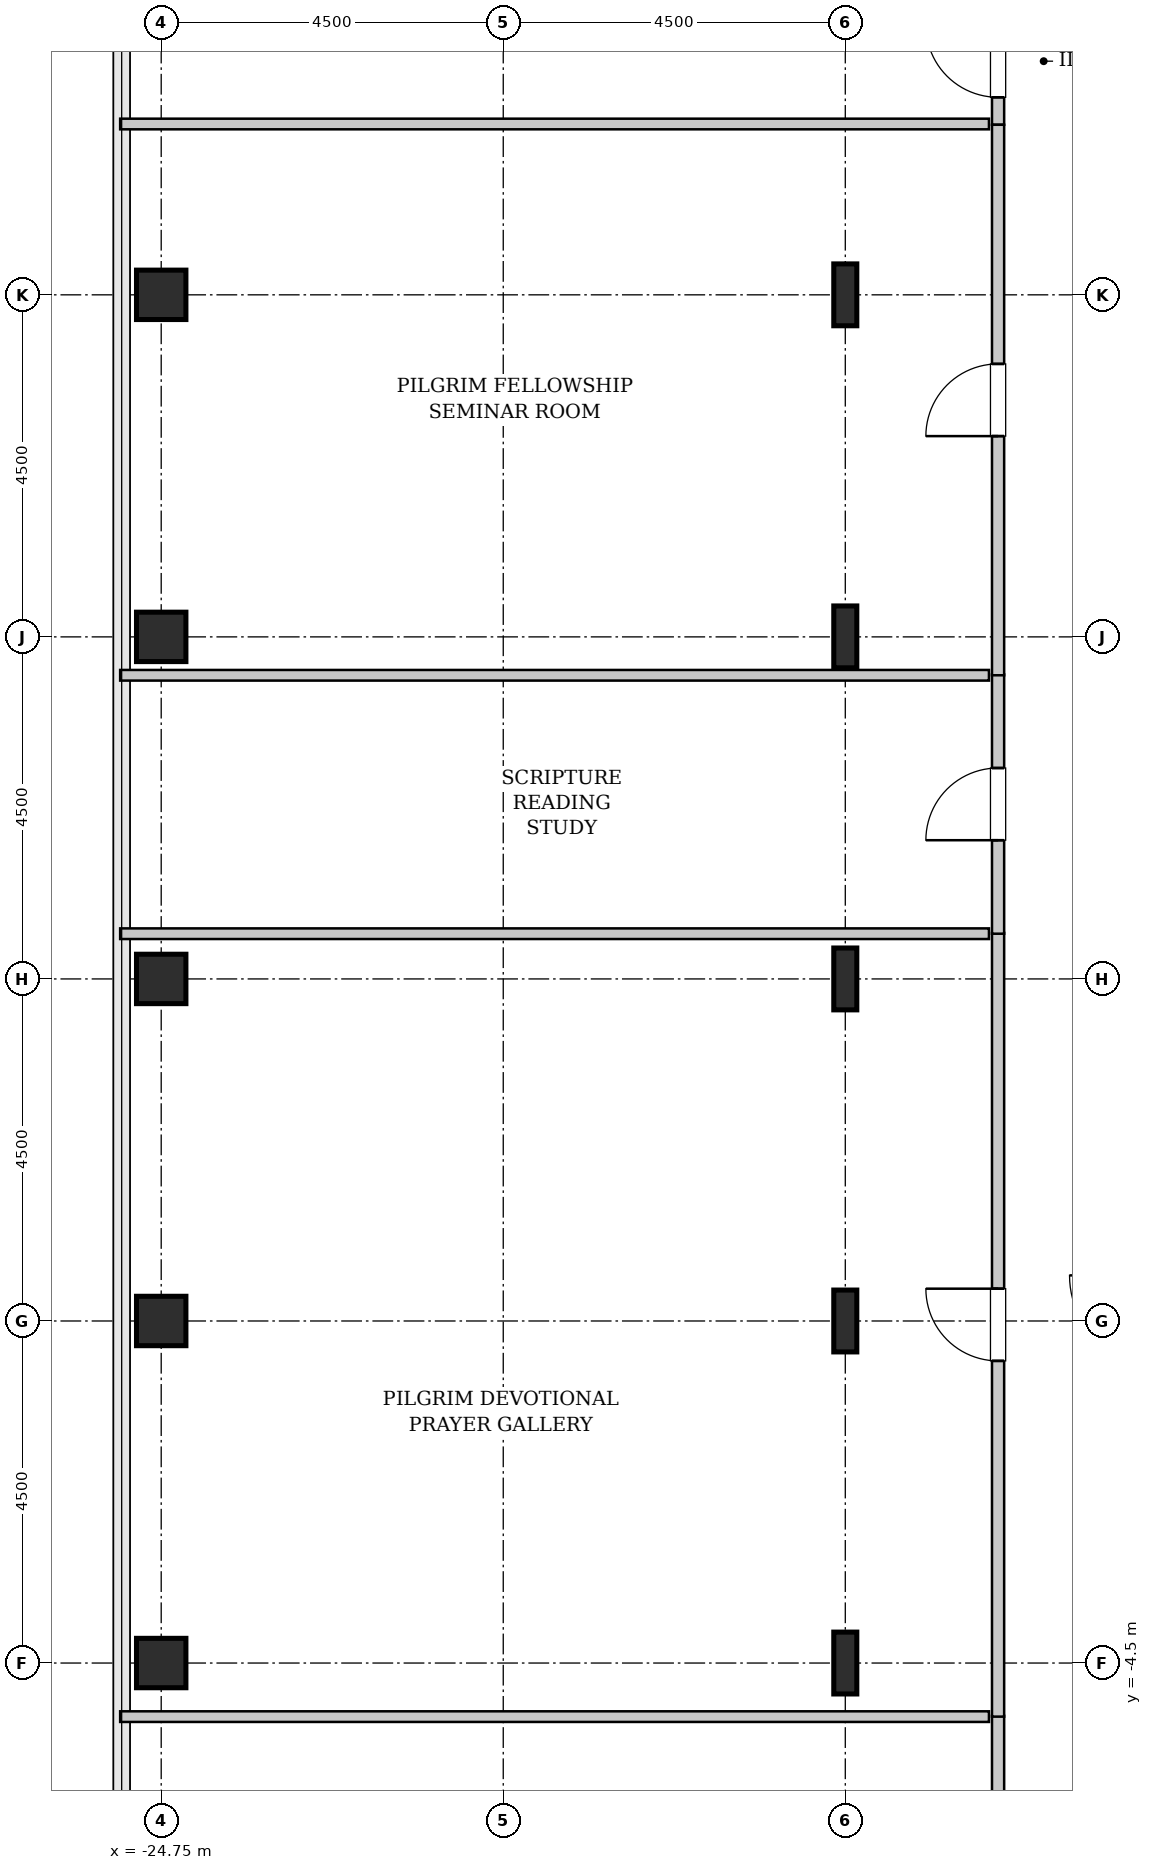
"""IFC4 building model, lengths in metres.
Left out: names, types, materials, properties, quantities, classifications, styles, units other than length and angle.
Written with IfcOpenShell. Run it as: python <this file> out.ifc"""

import sys

from ifc_helpers import new_model, si_unit, direction, frame, frame_2d, origin, origin_2d, place, context, subcontext, project, spatial, rectangle, hollow_rectangle, i_section, extrude, source, transform, mapped, element, fill, save


model = new_model("IFC4")
c1 = context("Model", 3, precision=1e-05, world=origin(), true_north=direction((0.0, 1.0)))
c2 = subcontext(c1, "Body", "Model", "MODEL_VIEW")
j1 = project(units=[si_unit("LENGTHUNIT", "METRE"), si_unit("PLANEANGLEUNIT", "RADIAN")], contexts=[c1])
p1 = place(None, origin())
s1 = spatial("IfcSite", under=j1, at=p1, CompositionType="ELEMENT")
p2 = place(p1, origin())
s2 = spatial("IfcBuilding", under=s1, at=p2, CompositionType="ELEMENT")
p3 = place(p2, frame((0.0, 0.0, 237.0)))
s3 = spatial("IfcBuildingStorey", under=s2, at=p3, CompositionType="ELEMENT", Elevation=237.0)
m1 = source(origin(), c2, "Body", "SweptSolid", [
    extrude(hollow_rectangle(XDim=0.65, YDim=0.65, WallThickness=0.032, InnerFilletRadius=0.032, OuterFilletRadius=0.064, at=origin_2d()), origin(), (0.0, 0.0, 1.0), 3.8),
])
for number, where, z_axis, x_axis in (
    (1, (-24.75, -4.5, 0.0), (0.0, 0.0, 1.0), (1.0, 0.0, 0.0)),
    (2, (-24.75, 0.0, 0.0), (0.0, 0.0, 1.0), (1.0, 0.0, 0.0)),
    (3, (-24.75, 4.5, 0.0), (0.0, 0.0, 1.0), (1.0, 0.0, 0.0)),
    (4, (-24.75, 9.0, 0.0), (0.0, 0.0, 1.0), (1.0, 0.0, 0.0)),
    (5, (-24.75, 13.5, 0.0), (0.0, 0.0, 1.0), (1.0, 0.0, 0.0)),
):
    element("IfcColumn", number, at=place(p3, frame(where, z_axis=z_axis, x_axis=x_axis)), inside=s3, PredefinedType="COLUMN", context=c2, shape_type="MappedRepresentation", body=[
        mapped(m1, transform((0.0, 0.0, 0.0), x_axis=(1.0, 0.0, 0.0), y_axis=(0.0, 1.0, 0.0), z_axis=(0.0, 0.0, 1.0), scale=1.0)),
    ])
m2 = source(origin(), c2, "Body", "SweptSolid", [
    extrude(i_section(OverallWidth=0.303, OverallDepth=0.814, WebThickness=0.021, FlangeThickness=0.04, FilletRadius=0.03, at=origin_2d()), origin(), (0.0, 0.0, 1.0), 3.8),
])
for number, where, z_axis, x_axis in (
    (6, (-15.75, -4.5, 0.0), (0.0, 0.0, 1.0), (1.0, 0.0, 0.0)),
    (7, (-15.75, 0.0, 0.0), (0.0, 0.0, 1.0), (1.0, 0.0, 0.0)),
    (8, (-15.75, 4.5, 0.0), (0.0, 0.0, 1.0), (1.0, 0.0, 0.0)),
    (9, (-15.75, 9.0, 0.0), (0.0, 0.0, 1.0), (1.0, 0.0, 0.0)),
    (10, (-15.75, 13.5, 0.0), (0.0, 0.0, 1.0), (1.0, 0.0, 0.0)),
):
    element("IfcColumn", number, at=place(p3, frame(where, z_axis=z_axis, x_axis=x_axis)), inside=s3, PredefinedType="COLUMN", context=c2, shape_type="MappedRepresentation", body=[
        mapped(m2, transform((0.0, 0.0, 0.0), x_axis=(1.0, 0.0, 0.0), y_axis=(0.0, 1.0, 0.0), z_axis=(0.0, 0.0, 1.0), scale=1.0)),
    ])
m3 = source(origin(), c2, "Body", "SweptSolid", [
    extrude(rectangle(XDim=3.31, YDim=0.16, at=frame_2d((1.655, 0.0))), origin(), (0.0, 0.0, 1.0), 3.535),
])
p4 = place(p3, frame((-13.74, -8.505, 0.0), z_axis=(0.0, 0.0, 1.0), x_axis=(0.0, 1.0, 0.0)))
e11 = element("IfcWall", 11, at=p4, inside=s3, PredefinedType="PARTITIONING", context=c2, shape_type="MappedRepresentation", body=[
    mapped(m3, transform((0.0, 0.0, 0.0), x_axis=(1.0, 0.0, 0.0), y_axis=(0.0, 1.0, 0.0), z_axis=(0.0, 0.0, 1.0), scale=1.0)),
])
p5 = place(p4, frame((1.18, 0.0, 0.0)))
e12 = element("IfcOpeningElement", 12, at=p5, cuts=e11, PredefinedType="OPENING", context=c2, shape_type="SweptSolid", body=[
    extrude(rectangle(XDim=0.95, YDim=2.1, at=frame_2d((0.475, 1.05))), frame((0.0, 0.09, 0.0), z_axis=(0.0, -1.0, 0.0), x_axis=(1.0, 0.0, 0.0)), (0.0, 0.0, 1.0), 0.18),
])
m4 = source(origin(), c2, "Body", "SweptSolid", [
    extrude(rectangle(XDim=11.43, YDim=0.14, at=frame_2d((5.715, 0.0))), origin(), (0.0, 0.0, 1.0), 3.535),
])
p6 = place(p3, frame((-25.29, -5.205, 0.0), z_axis=(0.0, 0.0, 1.0), x_axis=(1.0, 0.0, 0.0)))
e13 = element("IfcWall", 13, at=p6, inside=s3, PredefinedType="PARTITIONING", context=c2, shape_type="MappedRepresentation", body=[
    mapped(m4, transform((0.0, 0.0, 0.0), x_axis=(1.0, 0.0, 0.0), y_axis=(0.0, 1.0, 0.0), z_axis=(0.0, 0.0, 1.0), scale=1.0)),
])
m5 = source(origin(), c2, "Body", "SweptSolid", [
    extrude(rectangle(XDim=10.31, YDim=0.16, at=frame_2d((5.155, 0.0))), origin(), (0.0, 0.0, 1.0), 3.535),
])
p7 = place(p3, frame((-13.74, -5.205, 0.0), z_axis=(0.0, 0.0, 1.0), x_axis=(0.0, 1.0, 0.0)))
e14 = element("IfcWall", 14, at=p7, inside=s3, PredefinedType="PARTITIONING", context=c2, shape_type="MappedRepresentation", body=[
    mapped(m5, transform((0.0, 0.0, 0.0), x_axis=(1.0, 0.0, 0.0), y_axis=(0.0, 1.0, 0.0), z_axis=(0.0, 0.0, 1.0), scale=1.0)),
])
p8 = place(p7, frame((4.68, 0.0, 0.0)))
e15 = element("IfcOpeningElement", 15, at=p8, cuts=e14, PredefinedType="OPENING", context=c2, shape_type="SweptSolid", body=[
    extrude(rectangle(XDim=0.95, YDim=2.1, at=frame_2d((0.475, 1.05))), frame((0.0, 0.09, 0.0), z_axis=(0.0, -1.0, 0.0), x_axis=(1.0, 0.0, 0.0)), (0.0, 0.0, 1.0), 0.18),
])
p9 = place(p3, frame((-25.29, 5.095, 0.0), z_axis=(0.0, 0.0, 1.0), x_axis=(1.0, 0.0, 0.0)))
e16 = element("IfcWall", 16, at=p9, inside=s3, PredefinedType="PARTITIONING", context=c2, shape_type="MappedRepresentation", body=[
    mapped(m4, transform((0.0, 0.0, 0.0), x_axis=(1.0, 0.0, 0.0), y_axis=(0.0, 1.0, 0.0), z_axis=(0.0, 0.0, 1.0), scale=1.0)),
])
m6 = source(origin(), c2, "Body", "SweptSolid", [
    extrude(rectangle(XDim=3.41, YDim=0.16, at=frame_2d((1.705, 0.0))), origin(), (0.0, 0.0, 1.0), 3.535),
])
p10 = place(p3, frame((-13.74, 5.095, 0.0), z_axis=(0.0, 0.0, 1.0), x_axis=(0.0, 1.0, 0.0)))
e17 = element("IfcWall", 17, at=p10, inside=s3, PredefinedType="PARTITIONING", context=c2, shape_type="MappedRepresentation", body=[
    mapped(m6, transform((0.0, 0.0, 0.0), x_axis=(1.0, 0.0, 0.0), y_axis=(0.0, 1.0, 0.0), z_axis=(0.0, 0.0, 1.0), scale=1.0)),
])
p11 = place(p10, frame((1.23, 0.0, 0.0)))
e18 = element("IfcOpeningElement", 18, at=p11, cuts=e17, PredefinedType="OPENING", context=c2, shape_type="SweptSolid", body=[
    extrude(rectangle(XDim=0.95, YDim=2.1, at=frame_2d((0.475, 1.05))), frame((0.0, 0.09, 0.0), z_axis=(0.0, -1.0, 0.0), x_axis=(1.0, 0.0, 0.0)), (0.0, 0.0, 1.0), 0.18),
])
m7 = source(origin(), c2, "Body", "SweptSolid", [
    extrude(rectangle(XDim=11.43, YDim=0.14, at=frame_2d((5.715, 0.0))), origin(), (0.0, 0.0, 1.0), 2.925),
])
p12 = place(p3, frame((-25.29, 8.495, 0.0), z_axis=(0.0, 0.0, 1.0), x_axis=(1.0, 0.0, 0.0)))
e19 = element("IfcWall", 19, at=p12, inside=s3, PredefinedType="PARTITIONING", context=c2, shape_type="MappedRepresentation", body=[
    mapped(m7, transform((0.0, 0.0, 0.0), x_axis=(1.0, 0.0, 0.0), y_axis=(0.0, 1.0, 0.0), z_axis=(0.0, 0.0, 1.0), scale=1.0)),
])
m8 = source(origin(), c2, "Body", "SweptSolid", [
    extrude(rectangle(XDim=5.502, YDim=0.16, at=frame_2d((2.751, 0.0))), origin(), (0.0, 0.0, 1.0), 3.535),
])
p13 = place(p3, frame((-13.74, 15.738, 0.0), z_axis=(0.0, 0.0, 1.0), x_axis=(0.0, 1.0, 0.0)))
e20 = element("IfcWall", 20, at=p13, inside=s3, PredefinedType="PARTITIONING", context=c2, shape_type="MappedRepresentation", body=[
    mapped(m8, transform((0.0, 0.0, 0.0), x_axis=(1.0, 0.0, 0.0), y_axis=(0.0, 1.0, 0.0), z_axis=(0.0, 0.0, 1.0), scale=1.0)),
])
p14 = place(p13, frame((0.361, 0.0, 0.0)))
e21 = element("IfcOpeningElement", 21, at=p14, cuts=e20, PredefinedType="OPENING", context=c2, shape_type="SweptSolid", body=[
    extrude(rectangle(XDim=0.95, YDim=2.1, at=frame_2d((0.475, 1.05))), frame((0.0, 0.09, 0.0), z_axis=(0.0, -1.0, 0.0), x_axis=(1.0, 0.0, 0.0)), (0.0, 0.0, 1.0), 0.18),
])
p15 = place(p3, frame((-25.29, 15.748, 0.0), z_axis=(0.0, 0.0, 1.0), x_axis=(1.0, 0.0, 0.0)))
e22 = element("IfcWall", 22, at=p15, inside=s3, PredefinedType="PARTITIONING", context=c2, shape_type="MappedRepresentation", body=[
    mapped(m4, transform((0.0, 0.0, 0.0), x_axis=(1.0, 0.0, 0.0), y_axis=(0.0, 1.0, 0.0), z_axis=(0.0, 0.0, 1.0), scale=1.0)),
])
m9 = source(origin(), c2, "Body", "SweptSolid", [
    extrude(rectangle(XDim=7.242, YDim=0.16, at=frame_2d((3.621, 0.0))), origin(), (0.0, 0.0, 1.0), 3.535),
])
p16 = place(p3, frame((-13.74, 8.495, 0.0), z_axis=(0.0, 0.0, 1.0), x_axis=(0.0, 1.0, 0.0)))
e23 = element("IfcWall", 23, at=p16, inside=s3, PredefinedType="PARTITIONING", context=c2, shape_type="MappedRepresentation", body=[
    mapped(m9, transform((0.0, 0.0, 0.0), x_axis=(1.0, 0.0, 0.0), y_axis=(0.0, 1.0, 0.0), z_axis=(0.0, 0.0, 1.0), scale=1.0)),
])
p17 = place(p16, frame((3.146, 0.0, 0.0)))
e24 = element("IfcOpeningElement", 24, at=p17, cuts=e23, PredefinedType="OPENING", context=c2, shape_type="SweptSolid", body=[
    extrude(rectangle(XDim=0.95, YDim=2.1, at=frame_2d((0.475, 1.05))), frame((0.0, 0.09, 0.0), z_axis=(0.0, -1.0, 0.0), x_axis=(1.0, 0.0, 0.0)), (0.0, 0.0, 1.0), 0.18),
])
m10 = source(origin(), c2, "Body", "SweptSolid", [
    extrude(rectangle(XDim=0.95, YDim=2.1, at=frame_2d((0.475, 1.05))), frame((0.0, 0.025, 0.0), z_axis=(0.0, -1.0, 0.0), x_axis=(1.0, 0.0, 0.0)), (0.0, 0.0, 1.0), 0.05),
])
p18 = place(p8, origin())
e25 = element("IfcDoor", 25, at=p18, inside=s3, OperationType="SINGLE_SWING_RIGHT", PredefinedType="DOOR", context=c2, shape_type="MappedRepresentation", body=[
    mapped(m10, transform((0.0, 0.0, 0.0), x_axis=(1.0, 0.0, 0.0), y_axis=(0.0, 1.0, 0.0), z_axis=(0.0, 0.0, 1.0), scale=1.0)),
])
fill(e15, e25)
p19 = place(p11, origin())
e26 = element("IfcDoor", 26, at=p19, inside=s3, OperationType="SINGLE_SWING_LEFT", PredefinedType="DOOR", context=c2, shape_type="MappedRepresentation", body=[
    mapped(m10, transform((0.0, 0.0, 0.0), x_axis=(1.0, 0.0, 0.0), y_axis=(0.0, 1.0, 0.0), z_axis=(0.0, 0.0, 1.0), scale=1.0)),
])
fill(e18, e26)
p20 = place(p14, origin())
e27 = element("IfcDoor", 27, at=p20, inside=s3, OperationType="SINGLE_SWING_RIGHT", PredefinedType="DOOR", context=c2, shape_type="MappedRepresentation", body=[
    mapped(m10, transform((0.0, 0.0, 0.0), x_axis=(1.0, 0.0, 0.0), y_axis=(0.0, 1.0, 0.0), z_axis=(0.0, 0.0, 1.0), scale=1.0)),
])
fill(e21, e27)
p21 = place(p17, origin())
e28 = element("IfcDoor", 28, at=p21, inside=s3, OperationType="SINGLE_SWING_LEFT", PredefinedType="DOOR", context=c2, shape_type="MappedRepresentation", body=[
    mapped(m10, transform((0.0, 0.0, 0.0), x_axis=(1.0, 0.0, 0.0), y_axis=(0.0, 1.0, 0.0), z_axis=(0.0, 0.0, 1.0), scale=1.0)),
])
fill(e24, e28)
save(model, sys.argv[1])
